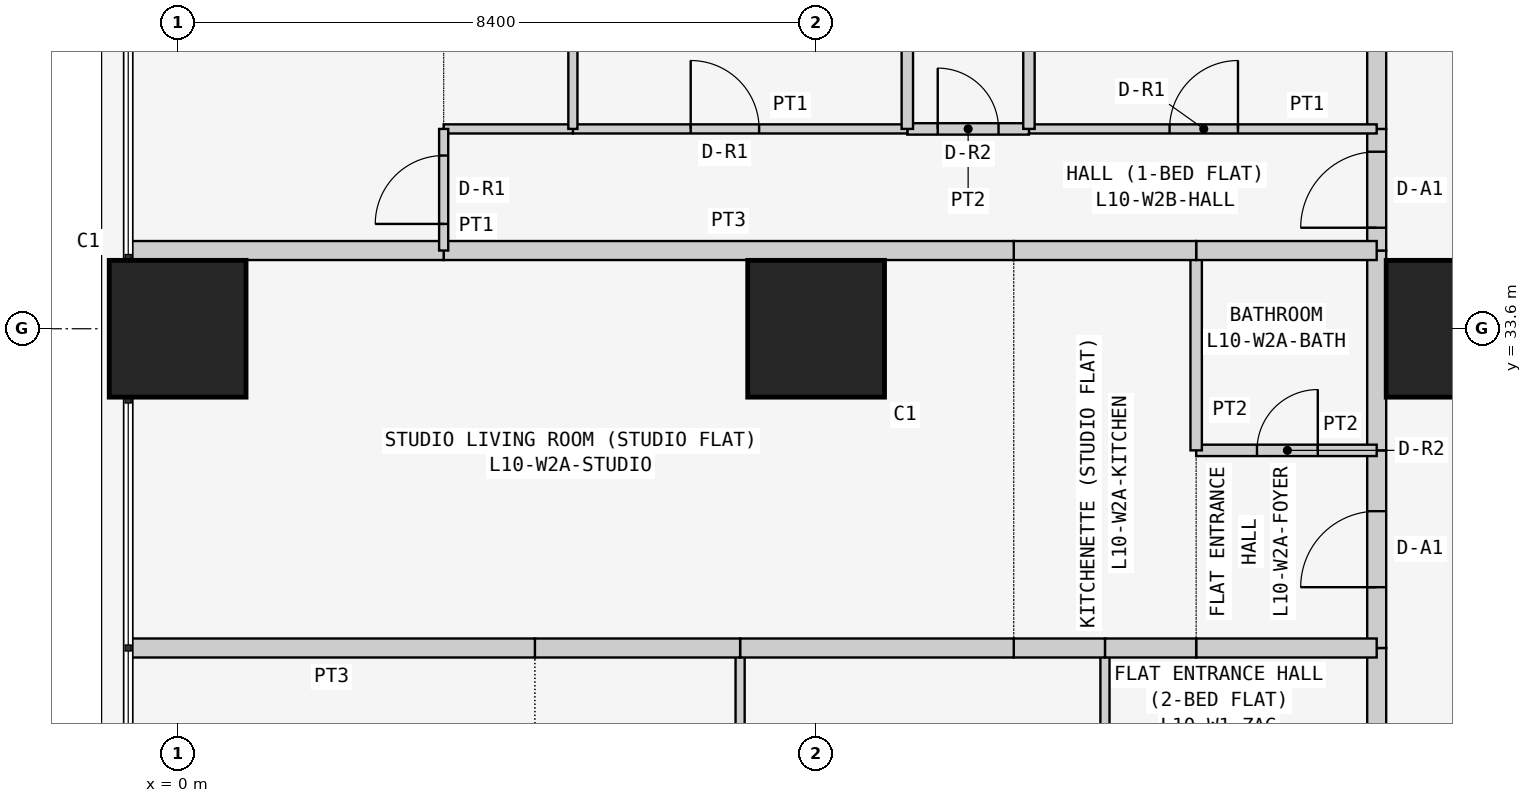
"""IFC4 building model, lengths in metres.
Left out: names, types, materials, properties, quantities, classifications, styles, units other than length and angle.
Written with IfcOpenShell. Run it as: python <this file> out.ifc"""

import sys

from ifc_helpers import new_model, si_unit, direction, frame, frame_2d, origin, origin_2d, place, context, subcontext, project, spatial, rectangle, extrude, element, fill, save


model = new_model("IFC4")
c1 = context("Model", 3, precision=1e-05, world=origin(), true_north=direction((0.0, 1.0)))
c2 = subcontext(c1, "Body", "Model", "MODEL_VIEW")
j1 = project(units=[si_unit("LENGTHUNIT", "METRE"), si_unit("PLANEANGLEUNIT", "RADIAN")], contexts=[c1])
p1 = place(None, origin())
s1 = spatial("IfcSite", under=j1, at=p1, CompositionType="ELEMENT")
p2 = place(p1, origin())
s2 = spatial("IfcBuilding", under=s1, at=p2, CompositionType="ELEMENT")
p3 = place(p2, frame((0.0, 0.0, 45.3)))
s3 = spatial("IfcBuildingStorey", under=s2, at=p3, CompositionType="ELEMENT", Elevation=45.3)
for number, where, z_axis, x_axis in (
    (1, (0.0, 33.6, 0.0), (0.0, 0.0, 1.0), (1.0, 0.0, 0.0)),
    (2, (8.4, 33.6, 0.0), (0.0, 0.0, 1.0), (1.0, 0.0, 0.0)),
    (3, (16.8, 33.6, 0.0), (0.0, 0.0, 1.0), (1.0, 0.0, 0.0)),
):
    element("IfcColumn", number, at=place(p3, frame(where, z_axis=z_axis, x_axis=x_axis)), inside=s3, PredefinedType="COLUMN", context=c2, shape_type="SweptSolid", body=[
        extrude(rectangle(XDim=1.8, YDim=1.8, at=origin_2d()), origin(), (0.0, 0.0, 1.0), 3.6),
    ])
p4 = place(p3, frame((15.775, 24.171, 0.0), z_axis=(0.0, 0.0, 1.0), x_axis=(0.0, 1.0, 0.0)))
e4 = element("IfcWall", 4, at=p4, inside=s3, PredefinedType="PARTITIONING", context=c2, shape_type="SweptSolid", body=[
    extrude(rectangle(XDim=5.229, YDim=0.25, at=frame_2d((2.615, 0.0))), origin(), (0.0, 0.0, 1.0), 3.45),
])
p5 = place(p4, frame((2.129, 0.0, 0.0)))
e5 = element("IfcOpeningElement", 5, at=p5, cuts=e4, PredefinedType="OPENING", context=c2, shape_type="SweptSolid", body=[
    extrude(rectangle(XDim=1.0, YDim=2.1, at=frame_2d((0.5, 1.05))), frame((0.0, 0.135, 0.0), z_axis=(0.0, -1.0, 0.0), x_axis=(1.0, 0.0, 0.0)), (0.0, 0.0, 1.0), 0.27),
])
p6 = place(p3, frame((15.775, 29.4, 0.0), z_axis=(0.0, 0.0, 1.0), x_axis=(0.0, 1.0, 0.0)))
e6 = element("IfcWall", 6, at=p6, inside=s3, PredefinedType="PARTITIONING", context=c2, shape_type="SweptSolid", body=[
    extrude(rectangle(XDim=2.6, YDim=0.25, at=frame_2d((1.3, 0.0))), origin(), (0.0, 0.0, 1.0), 3.45),
])
p7 = place(p6, frame((0.8, 0.0, 0.0)))
e7 = element("IfcOpeningElement", 7, at=p7, cuts=e6, PredefinedType="OPENING", context=c2, shape_type="SweptSolid", body=[
    extrude(rectangle(XDim=1.0, YDim=2.1, at=frame_2d((0.5, 1.05))), frame((0.0, 0.135, 0.0), z_axis=(0.0, -1.0, 0.0), x_axis=(1.0, 0.0, 0.0)), (0.0, 0.0, 1.0), 0.27),
])
p8 = place(p3, frame((15.775, 32.0, 0.0), z_axis=(0.0, 0.0, 1.0), x_axis=(0.0, 1.0, 0.0)))
e8 = element("IfcWall", 8, at=p8, inside=s3, PredefinedType="PARTITIONING", context=c2, shape_type="SweptSolid", body=[
    extrude(rectangle(XDim=2.629, YDim=0.25, at=frame_2d((1.314, 0.0))), origin(), (0.0, 0.0, 1.0), 3.45),
])
p9 = place(p3, frame((15.775, 34.629, 0.0), z_axis=(0.0, 0.0, 1.0), x_axis=(0.0, 1.0, 0.0)))
e9 = element("IfcWall", 9, at=p9, inside=s3, PredefinedType="PARTITIONING", context=c2, shape_type="SweptSolid", body=[
    extrude(rectangle(XDim=1.6, YDim=0.25, at=frame_2d((0.8, 0.0))), origin(), (0.0, 0.0, 1.0), 3.45),
])
p10 = place(p9, frame((0.3, 0.0, 0.0)))
e10 = element("IfcOpeningElement", 10, at=p10, cuts=e9, PredefinedType="OPENING", context=c2, shape_type="SweptSolid", body=[
    extrude(rectangle(XDim=1.0, YDim=2.1, at=frame_2d((0.5, 1.05))), frame((0.0, 0.135, 0.0), z_axis=(0.0, -1.0, 0.0), x_axis=(1.0, 0.0, 0.0)), (0.0, 0.0, 1.0), 0.27),
])
p11 = place(p3, frame((15.775, 36.229, 0.0), z_axis=(0.0, 0.0, 1.0), x_axis=(0.0, 1.0, 0.0)))
e11 = element("IfcWall", 11, at=p11, inside=s3, PredefinedType="PARTITIONING", context=c2, shape_type="SweptSolid", body=[
    extrude(rectangle(XDim=6.471, YDim=0.25, at=frame_2d((3.235, 0.0))), origin(), (0.0, 0.0, 1.0), 3.45),
])
p12 = place(p3, frame((12.2, 29.4, 0.0), z_axis=(0.0, 0.0, 1.0), x_axis=(0.0, -1.0, 0.0)))
e12 = element("IfcWall", 12, at=p12, inside=s3, PredefinedType="PARTITIONING", context=c2, shape_type="SweptSolid", body=[
    extrude(rectangle(XDim=5.229, YDim=0.12, at=frame_2d((2.615, 0.0))), origin(), (0.0, 0.0, 1.0), 3.45),
])
p13 = place(p3, frame((15.775, 29.4, 0.0), z_axis=(0.0, 0.0, 1.0), x_axis=(-1.0, 0.0, 0.0)))
e13 = element("IfcWall", 13, at=p13, inside=s3, PredefinedType="PARTITIONING", context=c2, shape_type="SweptSolid", body=[
    extrude(rectangle(XDim=2.375, YDim=0.25, at=frame_2d((1.188, 0.0))), origin(), (0.0, 0.0, 1.0), 3.45),
])
p14 = place(p3, frame((13.4, 29.4, 0.0), z_axis=(0.0, 0.0, 1.0), x_axis=(-1.0, 0.0, 0.0)))
e14 = element("IfcWall", 14, at=p14, inside=s3, PredefinedType="PARTITIONING", context=c2, shape_type="SweptSolid", body=[
    extrude(rectangle(XDim=1.2, YDim=0.25, at=frame_2d((0.6, 0.0))), origin(), (0.0, 0.0, 1.0), 3.45),
])
p15 = place(p3, frame((7.4, 29.4, 0.0), z_axis=(0.0, 0.0, 1.0), x_axis=(0.0, -1.0, 0.0)))
e15 = element("IfcWall", 15, at=p15, inside=s3, PredefinedType="PARTITIONING", context=c2, shape_type="SweptSolid", body=[
    extrude(rectangle(XDim=5.229, YDim=0.12, at=frame_2d((2.615, 0.0))), origin(), (0.0, 0.0, 1.0), 3.45),
])
p16 = place(p3, frame((12.2, 29.4, 0.0), z_axis=(0.0, 0.0, 1.0), x_axis=(-1.0, 0.0, 0.0)))
e16 = element("IfcWall", 16, at=p16, inside=s3, PredefinedType="PARTITIONING", context=c2, shape_type="SweptSolid", body=[
    extrude(rectangle(XDim=1.2, YDim=0.25, at=frame_2d((0.6, 0.0))), origin(), (0.0, 0.0, 1.0), 3.45),
])
p17 = place(p3, frame((11.0, 29.4, 0.0), z_axis=(0.0, 0.0, 1.0), x_axis=(-1.0, 0.0, 0.0)))
e17 = element("IfcWall", 17, at=p17, inside=s3, PredefinedType="PARTITIONING", context=c2, shape_type="SweptSolid", body=[
    extrude(rectangle(XDim=3.6, YDim=0.25, at=frame_2d((1.8, 0.0))), origin(), (0.0, 0.0, 1.0), 3.45),
])
p18 = place(p3, frame((7.4, 29.4, 0.0), z_axis=(0.0, 0.0, 1.0), x_axis=(-1.0, 0.0, 0.0)))
e18 = element("IfcWall", 18, at=p18, inside=s3, PredefinedType="PARTITIONING", context=c2, shape_type="SweptSolid", body=[
    extrude(rectangle(XDim=2.7, YDim=0.25, at=frame_2d((1.35, 0.0))), origin(), (0.0, 0.0, 1.0), 3.45),
])
p19 = place(p3, frame((4.7, 29.4, 0.0), z_axis=(0.0, 0.0, 1.0), x_axis=(-1.0, 0.0, 0.0)))
e19 = element("IfcWall", 19, at=p19, inside=s3, PredefinedType="PARTITIONING", context=c2, shape_type="SweptSolid", body=[
    extrude(rectangle(XDim=5.35, YDim=0.25, at=frame_2d((2.675, 0.0))), origin(), (0.0, 0.0, 1.0), 3.45),
])
p20 = place(p3, frame((13.4, 32.0, 0.0), z_axis=(0.0, 0.0, 1.0), x_axis=(1.0, 0.0, 0.0)))
e20 = element("IfcWall", 20, at=p20, inside=s3, PredefinedType="PARTITIONING", context=c2, shape_type="SweptSolid", body=[
    extrude(rectangle(XDim=2.375, YDim=0.15, at=frame_2d((1.188, 0.0))), origin(), (0.0, 0.0, 1.0), 3.45),
])
p21 = place(p20, frame((0.8, 0.0, 0.0)))
e21 = element("IfcOpeningElement", 21, at=p21, cuts=e20, PredefinedType="OPENING", context=c2, shape_type="SweptSolid", body=[
    extrude(rectangle(XDim=0.8, YDim=2.1, at=frame_2d((0.4, 1.05))), frame((0.0, 0.085, 0.0), z_axis=(0.0, -1.0, 0.0), x_axis=(1.0, 0.0, 0.0)), (0.0, 0.0, 1.0), 0.17),
])
p22 = place(p3, frame((13.4, 32.0, 0.0), z_axis=(0.0, 0.0, 1.0), x_axis=(0.0, 1.0, 0.0)))
e22 = element("IfcWall", 22, at=p22, inside=s3, PredefinedType="PARTITIONING", context=c2, shape_type="SweptSolid", body=[
    extrude(rectangle(XDim=2.629, YDim=0.15, at=frame_2d((1.314, 0.0))), origin(), (0.0, 0.0, 1.0), 3.45),
])
p23 = place(p3, frame((13.4, 34.629, 0.0), z_axis=(0.0, 0.0, 1.0), x_axis=(1.0, 0.0, 0.0)))
e23 = element("IfcWall", 23, at=p23, inside=s3, PredefinedType="PARTITIONING", context=c2, shape_type="SweptSolid", body=[
    extrude(rectangle(XDim=2.375, YDim=0.25, at=frame_2d((1.188, 0.0))), origin(), (0.0, 0.0, 1.0), 3.45),
])
p24 = place(p3, frame((11.0, 34.629, 0.0), z_axis=(0.0, 0.0, 1.0), x_axis=(1.0, 0.0, 0.0)))
e24 = element("IfcWall", 24, at=p24, inside=s3, PredefinedType="PARTITIONING", context=c2, shape_type="SweptSolid", body=[
    extrude(rectangle(XDim=2.4, YDim=0.25, at=frame_2d((1.2, 0.0))), origin(), (0.0, 0.0, 1.0), 3.45),
])
p25 = place(p3, frame((3.5, 34.629, 0.0), z_axis=(0.0, 0.0, 1.0), x_axis=(1.0, 0.0, 0.0)))
e25 = element("IfcWall", 25, at=p25, inside=s3, PredefinedType="PARTITIONING", context=c2, shape_type="SweptSolid", body=[
    extrude(rectangle(XDim=7.5, YDim=0.25, at=frame_2d((3.75, 0.0))), origin(), (0.0, 0.0, 1.0), 3.45),
])
p26 = place(p3, frame((-0.65, 34.629, 0.0), z_axis=(0.0, 0.0, 1.0), x_axis=(1.0, 0.0, 0.0)))
e26 = element("IfcWall", 26, at=p26, inside=s3, PredefinedType="PARTITIONING", context=c2, shape_type="SweptSolid", body=[
    extrude(rectangle(XDim=4.15, YDim=0.25, at=frame_2d((2.075, 0.0))), origin(), (0.0, 0.0, 1.0), 3.45),
])
p27 = place(p3, frame((11.2, 36.229, 0.0), z_axis=(0.0, 0.0, 1.0), x_axis=(1.0, 0.0, 0.0)))
e27 = element("IfcWall", 27, at=p27, inside=s3, PredefinedType="PARTITIONING", context=c2, shape_type="SweptSolid", body=[
    extrude(rectangle(XDim=4.575, YDim=0.12, at=frame_2d((2.288, 0.0))), origin(), (0.0, 0.0, 1.0), 3.45),
])
p28 = place(p27, frame((1.85, 0.0, 0.0)))
e28 = element("IfcOpeningElement", 28, at=p28, cuts=e27, PredefinedType="OPENING", context=c2, shape_type="SweptSolid", body=[
    extrude(rectangle(XDim=0.9, YDim=2.1, at=frame_2d((0.45, 1.05))), frame((0.0, 0.07, 0.0), z_axis=(0.0, -1.0, 0.0), x_axis=(1.0, 0.0, 0.0)), (0.0, 0.0, 1.0), 0.14),
])
p29 = place(p3, frame((9.6, 36.229, 0.0), z_axis=(0.0, 0.0, 1.0), x_axis=(1.0, 0.0, 0.0)))
e29 = element("IfcWall", 29, at=p29, inside=s3, PredefinedType="PARTITIONING", context=c2, shape_type="SweptSolid", body=[
    extrude(rectangle(XDim=1.6, YDim=0.15, at=frame_2d((0.8, 0.0))), origin(), (0.0, 0.0, 1.0), 3.45),
])
p30 = place(p29, frame((0.4, 0.0, 0.0)))
e30 = element("IfcOpeningElement", 30, at=p30, cuts=e29, PredefinedType="OPENING", context=c2, shape_type="SweptSolid", body=[
    extrude(rectangle(XDim=0.8, YDim=2.1, at=frame_2d((0.4, 1.05))), frame((0.0, 0.085, 0.0), z_axis=(0.0, -1.0, 0.0), x_axis=(1.0, 0.0, 0.0)), (0.0, 0.0, 1.0), 0.17),
])
p31 = place(p3, frame((5.2, 36.229, 0.0), z_axis=(0.0, 0.0, 1.0), x_axis=(1.0, 0.0, 0.0)))
e31 = element("IfcWall", 31, at=p31, inside=s3, PredefinedType="PARTITIONING", context=c2, shape_type="SweptSolid", body=[
    extrude(rectangle(XDim=4.4, YDim=0.12, at=frame_2d((2.2, 0.0))), origin(), (0.0, 0.0, 1.0), 3.45),
])
p32 = place(p31, frame((1.55, 0.0, 0.0)))
e32 = element("IfcOpeningElement", 32, at=p32, cuts=e31, PredefinedType="OPENING", context=c2, shape_type="SweptSolid", body=[
    extrude(rectangle(XDim=0.9, YDim=2.1, at=frame_2d((0.45, 1.05))), frame((0.0, 0.07, 0.0), z_axis=(0.0, -1.0, 0.0), x_axis=(1.0, 0.0, 0.0)), (0.0, 0.0, 1.0), 0.14),
])
p33 = place(p3, frame((3.5, 36.229, 0.0), z_axis=(0.0, 0.0, 1.0), x_axis=(1.0, 0.0, 0.0)))
e33 = element("IfcWall", 33, at=p33, inside=s3, PredefinedType="PARTITIONING", context=c2, shape_type="SweptSolid", body=[
    extrude(rectangle(XDim=1.7, YDim=0.12, at=frame_2d((0.85, 0.0))), origin(), (0.0, 0.0, 1.0), 3.45),
])
p34 = place(p3, frame((3.5, 34.629, 0.0), z_axis=(0.0, 0.0, 1.0), x_axis=(0.0, 1.0, 0.0)))
e34 = element("IfcWall", 34, at=p34, inside=s3, PredefinedType="PARTITIONING", context=c2, shape_type="SweptSolid", body=[
    extrude(rectangle(XDim=1.6, YDim=0.12, at=frame_2d((0.8, 0.0))), origin(), (0.0, 0.0, 1.0), 3.45),
])
p35 = place(p34, frame((0.35, 0.0, 0.0)))
e35 = element("IfcOpeningElement", 35, at=p35, cuts=e34, PredefinedType="OPENING", context=c2, shape_type="SweptSolid", body=[
    extrude(rectangle(XDim=0.9, YDim=2.1, at=frame_2d((0.45, 1.05))), frame((0.0, 0.07, 0.0), z_axis=(0.0, -1.0, 0.0), x_axis=(1.0, 0.0, 0.0)), (0.0, 0.0, 1.0), 0.14),
])
for number, where, z_axis, x_axis in (
    (36, (11.2, 36.229, 0.0), (0.0, 0.0, 1.0), (0.0, 1.0, 0.0)),
    (37, (9.6, 36.229, 0.0), (0.0, 0.0, 1.0), (0.0, 1.0, 0.0)),
):
    element("IfcWall", number, at=place(p3, frame(where, z_axis=z_axis, x_axis=x_axis)), inside=s3, PredefinedType="PARTITIONING", context=c2, shape_type="SweptSolid", body=[
        extrude(rectangle(XDim=6.471, YDim=0.15, at=frame_2d((3.235, 0.0))), origin(), (0.0, 0.0, 1.0), 3.45),
    ])
p36 = place(p3, frame((5.2, 36.229, 0.0), z_axis=(0.0, 0.0, 1.0), x_axis=(0.0, 1.0, 0.0)))
e38 = element("IfcWall", 38, at=p36, inside=s3, PredefinedType="PARTITIONING", context=c2, shape_type="SweptSolid", body=[
    extrude(rectangle(XDim=6.471, YDim=0.12, at=frame_2d((3.235, 0.0))), origin(), (0.0, 0.0, 1.0), 3.45),
])
p37 = place(p7, origin())
e39 = element("IfcDoor", 39, at=p37, inside=s3, OperationType="SINGLE_SWING_LEFT", PredefinedType="DOOR", context=c2, shape_type="SweptSolid", body=[
    extrude(rectangle(XDim=1.0, YDim=2.1, at=frame_2d((0.5, 1.05))), frame((0.0, 0.025, 0.0), z_axis=(0.0, -1.0, 0.0), x_axis=(1.0, 0.0, 0.0)), (0.0, 0.0, 1.0), 0.05),
])
fill(e7, e39)
p38 = place(p21, origin())
e40 = element("IfcDoor", 40, at=p38, inside=s3, OperationType="SINGLE_SWING_RIGHT", PredefinedType="DOOR", context=c2, shape_type="SweptSolid", body=[
    extrude(rectangle(XDim=0.8, YDim=2.1, at=frame_2d((0.4, 1.05))), frame((0.0, 0.025, 0.0), z_axis=(0.0, -1.0, 0.0), x_axis=(1.0, 0.0, 0.0)), (0.0, 0.0, 1.0), 0.05),
])
fill(e21, e40)
p39 = place(p10, origin())
e41 = element("IfcDoor", 41, at=p39, inside=s3, OperationType="SINGLE_SWING_LEFT", PredefinedType="DOOR", context=c2, shape_type="SweptSolid", body=[
    extrude(rectangle(XDim=1.0, YDim=2.1, at=frame_2d((0.5, 1.05))), frame((0.0, 0.025, 0.0), z_axis=(0.0, -1.0, 0.0), x_axis=(1.0, 0.0, 0.0)), (0.0, 0.0, 1.0), 0.05),
])
fill(e10, e41)
p40 = place(p28, origin())
e42 = element("IfcDoor", 42, at=p40, inside=s3, OperationType="SINGLE_SWING_RIGHT", PredefinedType="DOOR", context=c2, shape_type="SweptSolid", body=[
    extrude(rectangle(XDim=0.9, YDim=2.1, at=frame_2d((0.45, 1.05))), frame((0.0, 0.025, 0.0), z_axis=(0.0, -1.0, 0.0), x_axis=(1.0, 0.0, 0.0)), (0.0, 0.0, 1.0), 0.05),
])
fill(e28, e42)
p41 = place(p30, origin())
e43 = element("IfcDoor", 43, at=p41, inside=s3, OperationType="SINGLE_SWING_LEFT", PredefinedType="DOOR", context=c2, shape_type="SweptSolid", body=[
    extrude(rectangle(XDim=0.8, YDim=2.1, at=frame_2d((0.4, 1.05))), frame((0.0, 0.025, 0.0), z_axis=(0.0, -1.0, 0.0), x_axis=(1.0, 0.0, 0.0)), (0.0, 0.0, 1.0), 0.05),
])
fill(e30, e43)
p42 = place(p32, origin())
e44 = element("IfcDoor", 44, at=p42, inside=s3, OperationType="SINGLE_SWING_LEFT", PredefinedType="DOOR", context=c2, shape_type="SweptSolid", body=[
    extrude(rectangle(XDim=0.9, YDim=2.1, at=frame_2d((0.45, 1.05))), frame((0.0, 0.025, 0.0), z_axis=(0.0, -1.0, 0.0), x_axis=(1.0, 0.0, 0.0)), (0.0, 0.0, 1.0), 0.05),
])
fill(e32, e44)
p43 = place(p35, origin())
e45 = element("IfcDoor", 45, at=p43, inside=s3, OperationType="SINGLE_SWING_LEFT", PredefinedType="DOOR", context=c2, shape_type="SweptSolid", body=[
    extrude(rectangle(XDim=0.9, YDim=2.1, at=frame_2d((0.45, 1.05))), frame((0.0, 0.025, 0.0), z_axis=(0.0, -1.0, 0.0), x_axis=(1.0, 0.0, 0.0)), (0.0, 0.0, 1.0), 0.05),
])
fill(e35, e45)
save(model, sys.argv[1])
